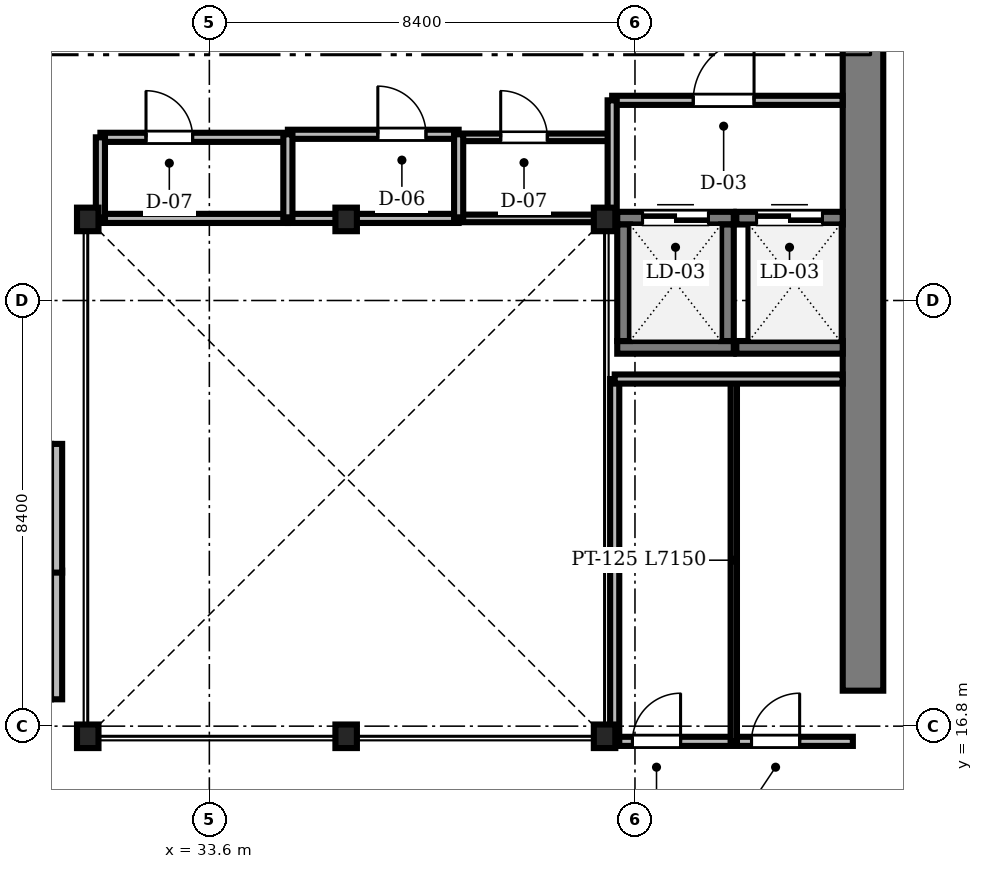
"""IFC4 building model, lengths in metres.
Left out: names, types, materials, properties, quantities, classifications, styles, units other than length and angle.
Written with IfcOpenShell. Run it as: python <this file> out.ifc"""

import sys

from ifc_helpers import new_model, si_unit, direction, frame, frame_2d, origin, origin_2d, place, context, subcontext, project, spatial, rectangle, i_section, extrude, source, transform, mapped, element, fill, save


model = new_model("IFC4")
c1 = context("Model", 3, precision=1e-05, world=origin(), true_north=direction((0.0, 1.0)))
c2 = subcontext(c1, "Body", "Model", "MODEL_VIEW")
j1 = project(units=[si_unit("LENGTHUNIT", "METRE"), si_unit("PLANEANGLEUNIT", "RADIAN")], contexts=[c1])
p1 = place(None, origin())
s1 = spatial("IfcSite", under=j1, at=p1, CompositionType="ELEMENT")
p2 = place(p1, origin())
s2 = spatial("IfcBuilding", under=s1, at=p2, CompositionType="ELEMENT")
p3 = place(p2, frame((0.0, 0.0, 126.1)))
s3 = spatial("IfcBuildingStorey", under=s2, at=p3, CompositionType="ELEMENT", Elevation=126.1)
m1 = source(origin(), c2, "Body", "SweptSolid", [
    extrude(rectangle(XDim=13.15, YDim=0.8, at=frame_2d((6.575, 0.0))), origin(), (0.0, 0.0, 1.0), 3.46),
])
p4 = place(p3, frame((46.5, 17.5, 0.0), z_axis=(0.0, 0.0, 1.0), x_axis=(0.0, 1.0, 0.0)))
e1 = element("IfcWall", 1, at=p4, inside=s3, PredefinedType="SHEAR", context=c2, shape_type="MappedRepresentation", body=[
    mapped(m1, transform((0.0, 0.0, 0.0), scale=1.0)),
])
m2 = source(origin(), c2, "Body", "SweptSolid", [
    extrude(i_section(OverallWidth=0.424, OverallDepth=0.465, WebThickness=0.035, FlangeThickness=0.056, FilletRadius=0.015, at=origin_2d()), origin(), (0.0, 0.0, 1.0), 3.46),
])
for number, where, z_axis, x_axis in (
    (2, (31.2, 16.6, 0.0), (0.0, 0.0, 1.0), (1.0, 0.0, 0.0)),
    (3, (36.3, 16.6, 0.0), (0.0, 0.0, 1.0), (1.0, 0.0, 0.0)),
    (4, (41.4, 16.6, 0.0), (0.0, 0.0, 1.0), (1.0, 0.0, 0.0)),
    (5, (41.4, 26.8, 0.0), (0.0, 0.0, 1.0), (1.0, 0.0, 0.0)),
    (6, (36.3, 26.8, 0.0), (0.0, 0.0, 1.0), (1.0, 0.0, 0.0)),
    (7, (31.2, 26.8, 0.0), (0.0, 0.0, 1.0), (1.0, 0.0, 0.0)),
):
    element("IfcColumn", number, at=place(p3, frame(where, z_axis=z_axis, x_axis=x_axis)), inside=s3, PredefinedType="COLUMN", context=c2, shape_type="MappedRepresentation", body=[
        mapped(m2, transform((0.0, 0.0, 0.0), scale=1.0)),
    ])
m3 = source(origin(), c2, "Body", "SweptSolid", [
    extrude(rectangle(XDim=2.54, YDim=0.22, at=frame_2d((1.27, 0.0))), origin(), (0.0, 0.0, 1.0), 3.46),
])
for number, where, z_axis, x_axis in (
    (8, (30.585, 17.33, 0.0), (0.0, 0.0, 1.0), (0.0, 1.0, 0.0)),
    (9, (30.585, 19.83, 0.0), (0.0, 0.0, 1.0), (0.0, 1.0, 0.0)),
):
    element("IfcWall", number, at=place(p3, frame(where, z_axis=z_axis, x_axis=x_axis)), inside=s3, PredefinedType="SOLIDWALL", context=c2, shape_type="MappedRepresentation", body=[
        mapped(m3, transform((0.0, 0.0, 0.0), scale=1.0)),
    ])
m4 = source(origin(), c2, "Body", "SweptSolid", [
    extrude(rectangle(XDim=2.3, YDim=0.25, at=frame_2d((1.15, 0.0))), origin(), (0.0, 0.0, 1.0), 3.46),
])
p5 = place(p3, frame((41.65, 24.275, 0.0), z_axis=(0.0, 0.0, 1.0), x_axis=(1.0, 0.0, 0.0)))
e10 = element("IfcWall", 10, at=p5, inside=s3, PredefinedType="SOLIDWALL", context=c2, shape_type="MappedRepresentation", body=[
    mapped(m4, transform((0.0, 0.0, 0.0), scale=1.0)),
])
p6 = place(p3, frame((41.65, 26.825, 0.0), z_axis=(0.0, 0.0, 1.0), x_axis=(1.0, 0.0, 0.0)))
e11 = element("IfcWall", 11, at=p6, inside=s3, PredefinedType="SOLIDWALL", context=c2, shape_type="MappedRepresentation", body=[
    mapped(m4, transform((0.0, 0.0, 0.0), scale=1.0)),
])
m5 = source(origin(), c2, "Body", "SweptSolid", [
    extrude(rectangle(XDim=1.3, YDim=2.3, at=frame_2d((0.65, 1.15))), frame((0.0, 0.135, 0.0), z_axis=(0.0, -1.0, 0.0), x_axis=(1.0, 0.0, 0.0)), (0.0, 0.0, 1.0), 0.27),
])
p7 = place(p6, frame((0.5, 0.0, 0.0)))
e12 = element("IfcOpeningElement", 12, at=p7, cuts=e11, PredefinedType="OPENING", context=c2, shape_type="MappedRepresentation", body=[
    mapped(m5, transform((0.0, 0.0, 0.0), scale=1.0)),
])
for number, where, z_axis, x_axis in (
    (13, (41.775, 24.4, 0.0), (0.0, 0.0, 1.0), (0.0, 1.0, 0.0)),
    (14, (43.825, 24.4, 0.0), (0.0, 0.0, 1.0), (0.0, 1.0, 0.0)),
):
    element("IfcWall", number, at=place(p3, frame(where, z_axis=z_axis, x_axis=x_axis)), inside=s3, PredefinedType="SOLIDWALL", context=c2, shape_type="MappedRepresentation", body=[
        mapped(m4, transform((0.0, 0.0, 0.0), scale=1.0)),
    ])
m6 = source(origin(), c2, "Body", "SweptSolid", [
    extrude(rectangle(XDim=2.1, YDim=0.25, at=frame_2d((1.05, 0.0))), origin(), (0.0, 0.0, 1.0), 3.46),
])
p8 = place(p3, frame((44.0, 24.275, 0.0), z_axis=(0.0, 0.0, 1.0), x_axis=(1.0, 0.0, 0.0)))
e15 = element("IfcWall", 15, at=p8, inside=s3, PredefinedType="SOLIDWALL", context=c2, shape_type="MappedRepresentation", body=[
    mapped(m6, transform((0.0, 0.0, 0.0), scale=1.0)),
])
p9 = place(p3, frame((44.0, 26.825, 0.0), z_axis=(0.0, 0.0, 1.0), x_axis=(1.0, 0.0, 0.0)))
e16 = element("IfcWall", 16, at=p9, inside=s3, PredefinedType="SOLIDWALL", context=c2, shape_type="MappedRepresentation", body=[
    mapped(m6, transform((0.0, 0.0, 0.0), scale=1.0)),
])
p10 = place(p9, frame((0.4, 0.0, 0.0)))
e17 = element("IfcOpeningElement", 17, at=p10, cuts=e16, PredefinedType="OPENING", context=c2, shape_type="MappedRepresentation", body=[
    mapped(m5, transform((0.0, 0.0, 0.0), scale=1.0)),
])
m7 = source(origin(), c2, "Body", "SweptSolid", [
    extrude(rectangle(XDim=4.548, YDim=0.18, at=frame_2d((2.274, 0.0))), origin(), (0.0, 0.0, 1.0), 3.092),
])
p11 = place(p3, frame((41.55, 29.15, 0.0), z_axis=(0.0, 0.0, 1.0), x_axis=(1.0, 0.0, 0.0)))
e18 = element("IfcWall", 18, at=p11, inside=s3, PredefinedType="PARTITIONING", context=c2, shape_type="MappedRepresentation", body=[
    mapped(m7, transform((0.0, 0.0, 0.0), scale=1.0)),
])
m8 = source(origin(), c2, "Body", "SweptSolid", [
    extrude(rectangle(XDim=1.2, YDim=2.2, at=frame_2d((0.6, 1.1))), frame((0.0, 0.1, 0.0), z_axis=(0.0, -1.0, 0.0), x_axis=(1.0, 0.0, 0.0)), (0.0, 0.0, 1.0), 0.2),
])
p12 = place(p11, frame((1.6, 0.0, 0.0)))
e19 = element("IfcOpeningElement", 19, at=p12, cuts=e18, PredefinedType="OPENING", context=c2, shape_type="MappedRepresentation", body=[
    mapped(m8, transform((0.0, 0.0, 0.0), scale=1.0)),
])
m9 = source(origin(), c2, "Body", "SweptSolid", [
    extrude(rectangle(XDim=4.7, YDim=0.18, at=frame_2d((2.35, 0.0))), origin(), (0.0, 0.0, 1.0), 2.852),
])
p13 = place(p3, frame((41.6, 16.5, 0.0), z_axis=(0.0, 0.0, 1.0), x_axis=(1.0, 0.0, 0.0)))
e20 = element("IfcWall", 20, at=p13, inside=s3, PredefinedType="PARTITIONING", context=c2, shape_type="MappedRepresentation", body=[
    mapped(m9, transform((0.0, 0.0, 0.0), scale=1.0)),
])
m10 = source(origin(), c2, "Body", "SweptSolid", [
    extrude(rectangle(XDim=0.95, YDim=2.15, at=frame_2d((0.475, 1.075))), frame((0.0, 0.1, 0.0), z_axis=(0.0, -1.0, 0.0), x_axis=(1.0, 0.0, 0.0)), (0.0, 0.0, 1.0), 0.2),
])
p14 = place(p13, frame((0.35, 0.0, 0.0)))
e21 = element("IfcOpeningElement", 21, at=p14, cuts=e20, PredefinedType="OPENING", context=c2, shape_type="MappedRepresentation", body=[
    mapped(m10, transform((0.0, 0.0, 0.0), scale=1.0)),
])
p15 = place(p13, frame((2.7, 0.0, 0.0)))
e22 = element("IfcOpeningElement", 22, at=p15, cuts=e20, PredefinedType="OPENING", context=c2, shape_type="MappedRepresentation", body=[
    mapped(m10, transform((0.0, 0.0, 0.0), scale=1.0)),
])
m11 = source(origin(), c2, "Body", "SweptSolid", [
    extrude(rectangle(XDim=3.7, YDim=0.18, at=frame_2d((1.85, 0.0))), origin(), (0.0, 0.0, 1.0), 3.092),
])
p16 = place(p3, frame((31.45, 28.42, 0.0), z_axis=(0.0, 0.0, 1.0), x_axis=(1.0, 0.0, 0.0)))
e23 = element("IfcWall", 23, at=p16, inside=s3, PredefinedType="PARTITIONING", context=c2, shape_type="MappedRepresentation", body=[
    mapped(m11, transform((0.0, 0.0, 0.0), scale=1.0)),
])
m12 = source(origin(), c2, "Body", "SweptSolid", [
    extrude(rectangle(XDim=0.92, YDim=2.1, at=frame_2d((0.46, 1.05))), frame((0.0, 0.1, 0.0), z_axis=(0.0, -1.0, 0.0), x_axis=(1.0, 0.0, 0.0)), (0.0, 0.0, 1.0), 0.2),
])
p17 = place(p16, frame((0.9, 0.0, 0.0)))
e24 = element("IfcOpeningElement", 24, at=p17, cuts=e23, PredefinedType="OPENING", context=c2, shape_type="MappedRepresentation", body=[
    mapped(m12, transform((0.0, 0.0, 0.0), scale=1.0)),
])
m13 = source(origin(), c2, "Body", "SweptSolid", [
    extrude(rectangle(XDim=3.37, YDim=0.18, at=frame_2d((1.685, 0.0))), origin(), (0.0, 0.0, 1.0), 3.46),
])
p18 = place(p3, frame((35.15, 28.48, 0.0), z_axis=(0.0, 0.0, 1.0), x_axis=(1.0, 0.0, 0.0)))
e25 = element("IfcWall", 25, at=p18, inside=s3, PredefinedType="PARTITIONING", context=c2, shape_type="MappedRepresentation", body=[
    mapped(m13, transform((0.0, 0.0, 0.0), scale=1.0)),
])
p19 = place(p18, frame((1.775, 0.0, 0.0)))
e26 = element("IfcOpeningElement", 26, at=p19, cuts=e25, PredefinedType="OPENING", context=c2, shape_type="MappedRepresentation", body=[
    mapped(m10, transform((0.0, 0.0, 0.0), scale=1.0)),
])
m14 = source(origin(), c2, "Body", "SweptSolid", [
    extrude(rectangle(XDim=3.0, YDim=0.15, at=frame_2d((1.5, 0.0))), origin(), (0.0, 0.0, 1.0), 3.46),
])
p20 = place(p3, frame((38.52, 28.42, 0.0), z_axis=(0.0, 0.0, 1.0), x_axis=(1.0, 0.0, 0.0)))
e27 = element("IfcWall", 27, at=p20, inside=s3, PredefinedType="PARTITIONING", context=c2, shape_type="MappedRepresentation", body=[
    mapped(m14, transform((0.0, 0.0, 0.0), scale=1.0)),
])
m15 = source(origin(), c2, "Body", "SweptSolid", [
    extrude(rectangle(XDim=0.92, YDim=2.1, at=frame_2d((0.46, 1.05))), frame((0.0, 0.085, 0.0), z_axis=(0.0, -1.0, 0.0), x_axis=(1.0, 0.0, 0.0)), (0.0, 0.0, 1.0), 0.17),
])
p21 = place(p20, frame((0.83, 0.0, 0.0)))
e28 = element("IfcOpeningElement", 28, at=p21, cuts=e27, PredefinedType="OPENING", context=c2, shape_type="MappedRepresentation", body=[
    mapped(m15, transform((0.0, 0.0, 0.0), scale=1.0)),
])
m16 = source(origin(), c2, "Body", "SweptSolid", [
    extrude(rectangle(XDim=7.15, YDim=0.18, at=frame_2d((3.575, 0.0))), origin(), (0.0, 0.0, 1.0), 2.852),
])
p22 = place(p3, frame((41.6, 16.5, 0.0), z_axis=(0.0, 0.0, 1.0), x_axis=(0.0, 1.0, 0.0)))
e29 = element("IfcWall", 29, at=p22, inside=s3, PredefinedType="PARTITIONING", context=c2, shape_type="MappedRepresentation", body=[
    mapped(m16, transform((0.0, 0.0, 0.0), scale=1.0)),
])
m17 = source(origin(), c2, "Body", "SweptSolid", [
    extrude(rectangle(XDim=7.15, YDim=0.125, at=frame_2d((3.575, 0.0))), origin(), (0.0, 0.0, 1.0), 2.852),
])
p23 = place(p3, frame((43.95, 16.5, 0.0), z_axis=(0.0, 0.0, 1.0), x_axis=(0.0, 1.0, 0.0)))
e30 = element("IfcWall", 30, at=p23, inside=s3, PredefinedType="PARTITIONING", context=c2, shape_type="MappedRepresentation", body=[
    mapped(m17, transform((0.0, 0.0, 0.0), scale=1.0)),
])
m18 = source(origin(), c2, "Body", "SweptSolid", [
    extrude(rectangle(XDim=4.498, YDim=0.18, at=frame_2d((2.249, 0.0))), origin(), (0.0, 0.0, 1.0), 3.46),
])
p24 = place(p3, frame((41.6, 23.65, 0.0), z_axis=(0.0, 0.0, 1.0), x_axis=(1.0, 0.0, 0.0)))
e31 = element("IfcWall", 31, at=p24, inside=s3, PredefinedType="PARTITIONING", context=c2, shape_type="MappedRepresentation", body=[
    mapped(m18, transform((0.0, 0.0, 0.0), scale=1.0)),
])
m19 = source(origin(), c2, "Body", "SweptSolid", [
    extrude(rectangle(XDim=3.7, YDim=0.18, at=frame_2d((1.85, 0.0))), origin(), (0.0, 0.0, 1.0), 3.002),
])
p25 = place(p3, frame((31.45, 26.82, 0.0), z_axis=(0.0, 0.0, 1.0), x_axis=(1.0, 0.0, 0.0)))
e32 = element("IfcWall", 32, at=p25, inside=s3, PredefinedType="PARTITIONING", context=c2, shape_type="MappedRepresentation", body=[
    mapped(m19, transform((0.0, 0.0, 0.0), scale=1.0)),
])
m20 = source(origin(), c2, "Body", "SweptSolid", [
    extrude(rectangle(XDim=3.37, YDim=0.18, at=frame_2d((1.685, 0.0))), origin(), (0.0, 0.0, 1.0), 3.002),
])
p26 = place(p3, frame((35.15, 26.82, 0.0), z_axis=(0.0, 0.0, 1.0), x_axis=(1.0, 0.0, 0.0)))
e33 = element("IfcWall", 33, at=p26, inside=s3, PredefinedType="PARTITIONING", context=c2, shape_type="MappedRepresentation", body=[
    mapped(m20, transform((0.0, 0.0, 0.0), scale=1.0)),
])
m21 = source(origin(), c2, "Body", "SweptSolid", [
    extrude(rectangle(XDim=3.0, YDim=0.15, at=frame_2d((1.5, 0.0))), origin(), (0.0, 0.0, 1.0), 2.852),
])
p27 = place(p3, frame((38.52, 26.82, 0.0), z_axis=(0.0, 0.0, 1.0), x_axis=(1.0, 0.0, 0.0)))
e34 = element("IfcWall", 34, at=p27, inside=s3, PredefinedType="PARTITIONING", context=c2, shape_type="MappedRepresentation", body=[
    mapped(m21, transform((0.0, 0.0, 0.0), scale=1.0)),
])
m22 = source(origin(), c2, "Body", "SweptSolid", [
    extrude(rectangle(XDim=2.35, YDim=0.18, at=frame_2d((1.175, 0.0))), origin(), (0.0, 0.0, 1.0), 2.852),
])
p28 = place(p3, frame((41.55, 26.8, 0.0), z_axis=(0.0, 0.0, 1.0), x_axis=(0.0, 1.0, 0.0)))
e35 = element("IfcWall", 35, at=p28, inside=s3, PredefinedType="PARTITIONING", context=c2, shape_type="MappedRepresentation", body=[
    mapped(m22, transform((0.0, 0.0, 0.0), scale=1.0)),
])
m23 = source(origin(), c2, "Body", "SweptSolid", [
    extrude(rectangle(XDim=1.66, YDim=0.18, at=frame_2d((0.83, 0.0))), origin(), (0.0, 0.0, 1.0), 3.002),
])
for number, where, z_axis, x_axis in (
    (36, (35.15, 26.82, 0.0), (0.0, 0.0, 1.0), (0.0, 1.0, 0.0)),
    (37, (38.52, 26.82, 0.0), (0.0, 0.0, 1.0), (0.0, 1.0, 0.0)),
):
    element("IfcWall", number, at=place(p3, frame(where, z_axis=z_axis, x_axis=x_axis)), inside=s3, PredefinedType="PARTITIONING", context=c2, shape_type="MappedRepresentation", body=[
        mapped(m23, transform((0.0, 0.0, 0.0), scale=1.0)),
    ])
m24 = source(origin(), c2, "Body", "SweptSolid", [
    extrude(rectangle(XDim=1.6, YDim=0.18, at=frame_2d((0.8, 0.0))), origin(), (0.0, 0.0, 1.0), 3.002),
])
p29 = place(p3, frame((31.45, 26.82, 0.0), z_axis=(0.0, 0.0, 1.0), x_axis=(0.0, 1.0, 0.0)))
e38 = element("IfcWall", 38, at=p29, inside=s3, PredefinedType="PARTITIONING", context=c2, shape_type="MappedRepresentation", body=[
    mapped(m24, transform((0.0, 0.0, 0.0), scale=1.0)),
])
m25 = source(origin(), c2, "Body", "SweptSolid", [
    extrude(rectangle(XDim=1.3, YDim=2.3, at=frame_2d((0.65, 1.15))), frame((0.0, 0.025, 0.0), z_axis=(0.0, -1.0, 0.0), x_axis=(1.0, 0.0, 0.0)), (0.0, 0.0, 1.0), 0.05),
])
p30 = place(p7, origin())
e39 = element("IfcDoor", 39, at=p30, inside=s3, OperationType="DOUBLE_DOOR_SLIDING", PredefinedType="DOOR", context=c2, shape_type="MappedRepresentation", body=[
    mapped(m25, transform((0.0, 0.0, 0.0), scale=1.0)),
])
fill(e12, e39)
p31 = place(p10, origin())
e40 = element("IfcDoor", 40, at=p31, inside=s3, OperationType="DOUBLE_DOOR_SLIDING", PredefinedType="DOOR", context=c2, shape_type="MappedRepresentation", body=[
    mapped(m25, transform((0.0, 0.0, 0.0), scale=1.0)),
])
fill(e17, e40)
m26 = source(origin(), c2, "Body", "SweptSolid", [
    extrude(rectangle(XDim=1.2, YDim=2.2, at=frame_2d((0.6, 1.1))), frame((0.0, 0.025, 0.0), z_axis=(0.0, -1.0, 0.0), x_axis=(1.0, 0.0, 0.0)), (0.0, 0.0, 1.0), 0.05),
])
p32 = place(p12, origin())
e41 = element("IfcDoor", 41, at=p32, inside=s3, OperationType="SINGLE_SWING_RIGHT", PredefinedType="DOOR", context=c2, shape_type="MappedRepresentation", body=[
    mapped(m26, transform((0.0, 0.0, 0.0), scale=1.0)),
])
fill(e19, e41)
m27 = source(origin(), c2, "Body", "SweptSolid", [
    extrude(rectangle(XDim=0.95, YDim=2.15, at=frame_2d((0.475, 1.075))), frame((0.0, 0.025, 0.0), z_axis=(0.0, -1.0, 0.0), x_axis=(1.0, 0.0, 0.0)), (0.0, 0.0, 1.0), 0.05),
])
p33 = place(p14, origin())
e42 = element("IfcDoor", 42, at=p33, inside=s3, OperationType="SINGLE_SWING_RIGHT", PredefinedType="DOOR", context=c2, shape_type="MappedRepresentation", body=[
    mapped(m27, transform((0.0, 0.0, 0.0), scale=1.0)),
])
fill(e21, e42)
p34 = place(p15, origin())
e43 = element("IfcDoor", 43, at=p34, inside=s3, OperationType="SINGLE_SWING_RIGHT", PredefinedType="DOOR", context=c2, shape_type="MappedRepresentation", body=[
    mapped(m27, transform((0.0, 0.0, 0.0), scale=1.0)),
])
fill(e22, e43)
m28 = source(origin(), c2, "Body", "SweptSolid", [
    extrude(rectangle(XDim=0.92, YDim=2.1, at=frame_2d((0.46, 1.05))), frame((0.0, 0.025, 0.0), z_axis=(0.0, -1.0, 0.0), x_axis=(1.0, 0.0, 0.0)), (0.0, 0.0, 1.0), 0.05),
])
p35 = place(p17, origin())
e44 = element("IfcDoor", 44, at=p35, inside=s3, OperationType="SINGLE_SWING_LEFT", PredefinedType="DOOR", context=c2, shape_type="MappedRepresentation", body=[
    mapped(m28, transform((0.0, 0.0, 0.0), scale=1.0)),
])
fill(e24, e44)
p36 = place(p19, origin())
e45 = element("IfcDoor", 45, at=p36, inside=s3, OperationType="SINGLE_SWING_LEFT", PredefinedType="DOOR", context=c2, shape_type="MappedRepresentation", body=[
    mapped(m27, transform((0.0, 0.0, 0.0), scale=1.0)),
])
fill(e26, e45)
p37 = place(p21, origin())
e46 = element("IfcDoor", 46, at=p37, inside=s3, OperationType="SINGLE_SWING_LEFT", PredefinedType="DOOR", context=c2, shape_type="MappedRepresentation", body=[
    mapped(m28, transform((0.0, 0.0, 0.0), scale=1.0)),
])
fill(e28, e46)
save(model, sys.argv[1])
